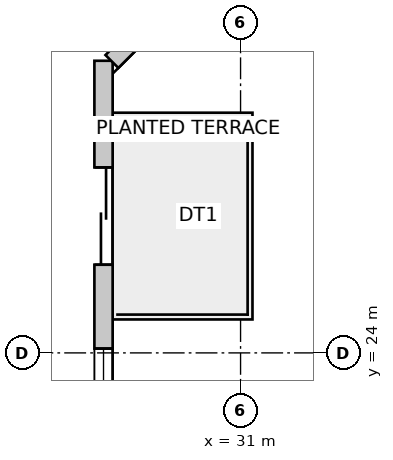
"""IFC4 building model, lengths in metres.
Left out: names, types, materials, properties, quantities, classifications, styles, units other than length and angle.
Written with IfcOpenShell. Run it as: python <this file> out.ifc"""

import sys

from ifc_helpers import new_model, si_unit, direction, frame, frame_2d, origin, place, context, subcontext, project, spatial, rectangle, extrude, source, transform, mapped, element, fill, save


model = new_model("IFC4")
c1 = context("Model", 3, precision=1e-05, world=origin(), true_north=direction((0.0, 1.0)))
c2 = subcontext(c1, "Body", "Model", "MODEL_VIEW")
j1 = project(units=[si_unit("LENGTHUNIT", "METRE"), si_unit("PLANEANGLEUNIT", "RADIAN")], contexts=[c1])
p1 = place(None, origin())
s1 = spatial("IfcSite", under=j1, at=p1, CompositionType="ELEMENT")
p2 = place(p1, origin())
s2 = spatial("IfcBuilding", under=s1, at=p2, CompositionType="ELEMENT")
p3 = place(p2, frame((0.0, 0.0, 110.6)))
s3 = spatial("IfcBuildingStorey", under=s2, at=p3, CompositionType="ELEMENT", Elevation=110.6)
p4 = place(p3, frame((28.746, 11.057, 0.0), z_axis=(0.0, 0.0, 1.0), x_axis=(0.0, 1.0, 0.0)))
e1 = element("IfcWall", 1, at=p4, inside=s3, PredefinedType="SOLIDWALL", context=c2, shape_type="SweptSolid", body=[
    extrude(rectangle(XDim=17.747, YDim=0.3, at=frame_2d((8.874, 0.0))), origin(), (0.0, 0.0, 1.0), 3.35),
])
m1 = source(origin(), c2, "Body", "SweptSolid", [
    extrude(rectangle(XDim=1.6, YDim=2.15, at=frame_2d((0.8, 1.075))), frame((0.0, 0.16, 0.0), z_axis=(0.0, -1.0, 0.0), x_axis=(1.0, 0.0, 0.0)), (0.0, 0.0, 1.0), 0.32),
])
p5 = place(p4, frame((14.393, 0.0, 0.0)))
e2 = element("IfcOpeningElement", 2, at=p5, cuts=e1, PredefinedType="OPENING", context=c2, shape_type="MappedRepresentation", body=[
    mapped(m1, transform((0.0, 0.0, 0.0), scale=1.0)),
])
m2 = source(origin(), c2, "Body", "SweptSolid", [
    extrude(rectangle(XDim=2.4, YDim=2.2, at=frame_2d((1.2, 1.1))), frame((0.0, 0.16, 0.0), z_axis=(0.0, -1.0, 0.0), x_axis=(1.0, 0.0, 0.0)), (0.0, 0.0, 1.0), 0.32),
])
p6 = place(p4, frame((1.419, 0.0, 0.85)))
e3 = element("IfcOpeningElement", 3, at=p6, cuts=e1, PredefinedType="OPENING", context=c2, shape_type="MappedRepresentation", body=[
    mapped(m2, transform((0.0, 0.0, 0.0), scale=1.0)),
])
m3 = source(origin(), c2, "Body", "SweptSolid", [
    extrude(rectangle(XDim=2.1, YDim=2.0, at=frame_2d((1.05, 1.0))), frame((0.0, 0.16, 0.0), z_axis=(0.0, -1.0, 0.0), x_axis=(1.0, 0.0, 0.0)), (0.0, 0.0, 1.0), 0.32),
])
p7 = place(p4, frame((6.167, 0.0, 0.85)))
e4 = element("IfcOpeningElement", 4, at=p7, cuts=e1, PredefinedType="OPENING", context=c2, shape_type="MappedRepresentation", body=[
    mapped(m3, transform((0.0, 0.0, 0.0), scale=1.0)),
])
p8 = place(p4, frame((10.614, 0.0, 0.85)))
e5 = element("IfcOpeningElement", 5, at=p8, cuts=e1, PredefinedType="OPENING", context=c2, shape_type="MappedRepresentation", body=[
    mapped(m2, transform((0.0, 0.0, 0.0), scale=1.0)),
])
p9 = place(p3, frame((28.884, 28.792, 0.0), z_axis=(0.0, 0.0, 1.0), x_axis=(0.707064797706, 0.707148762175, 0.0)))
e6 = element("IfcWall", 6, at=p9, inside=s3, PredefinedType="SOLIDWALL", context=c2, shape_type="SweptSolid", body=[
    extrude(rectangle(XDim=2.908, YDim=0.3, at=frame_2d((1.454, 0.0))), origin(), (0.0, 0.0, 1.0), 3.35),
])
m4 = source(origin(), c2, "Body", "SweptSolid", [
    extrude(rectangle(XDim=1.8, YDim=2.1, at=frame_2d((0.9, 1.05))), frame((0.0, 0.16, 0.0), z_axis=(0.0, -1.0, 0.0), x_axis=(1.0, 0.0, 0.0)), (0.0, 0.0, 1.0), 0.32),
])
p10 = place(p9, frame((0.554, 0.0, 0.85)))
e7 = element("IfcOpeningElement", 7, at=p10, cuts=e6, PredefinedType="OPENING", context=c2, shape_type="MappedRepresentation", body=[
    mapped(m4, transform((0.0, 0.0, 0.0), scale=1.0)),
])
m5 = source(origin(), c2, "Body", "SweptSolid", [
    extrude(rectangle(XDim=1.6, YDim=2.15, at=frame_2d((0.8, 1.075))), frame((0.0, 0.025, 0.0), z_axis=(0.0, -1.0, 0.0), x_axis=(1.0, 0.0, 0.0)), (0.0, 0.0, 1.0), 0.05),
])
p11 = place(p5, origin())
e8 = element("IfcDoor", 8, at=p11, inside=s3, OperationType="DOUBLE_DOOR_SLIDING", PredefinedType="DOOR", context=c2, shape_type="MappedRepresentation", body=[
    mapped(m5, transform((0.0, 0.0, 0.0), scale=1.0)),
])
fill(e2, e8)
m6 = source(origin(), c2, "Body", "SweptSolid", [
    extrude(rectangle(XDim=2.4, YDim=2.2, at=frame_2d((1.2, 1.1))), frame((0.0, -0.015, 0.0), z_axis=(0.0, -1.0, 0.0), x_axis=(1.0, 0.0, 0.0)), (0.0, 0.0, 1.0), 0.06),
])
p12 = place(p8, origin())
e9 = element("IfcWindow", 9, at=p12, inside=s3, PartitioningType="SINGLE_PANEL", PredefinedType="WINDOW", context=c2, shape_type="MappedRepresentation", body=[
    mapped(m6, transform((0.0, 0.0, 0.0), scale=1.0)),
])
fill(e5, e9)
save(model, sys.argv[1])
